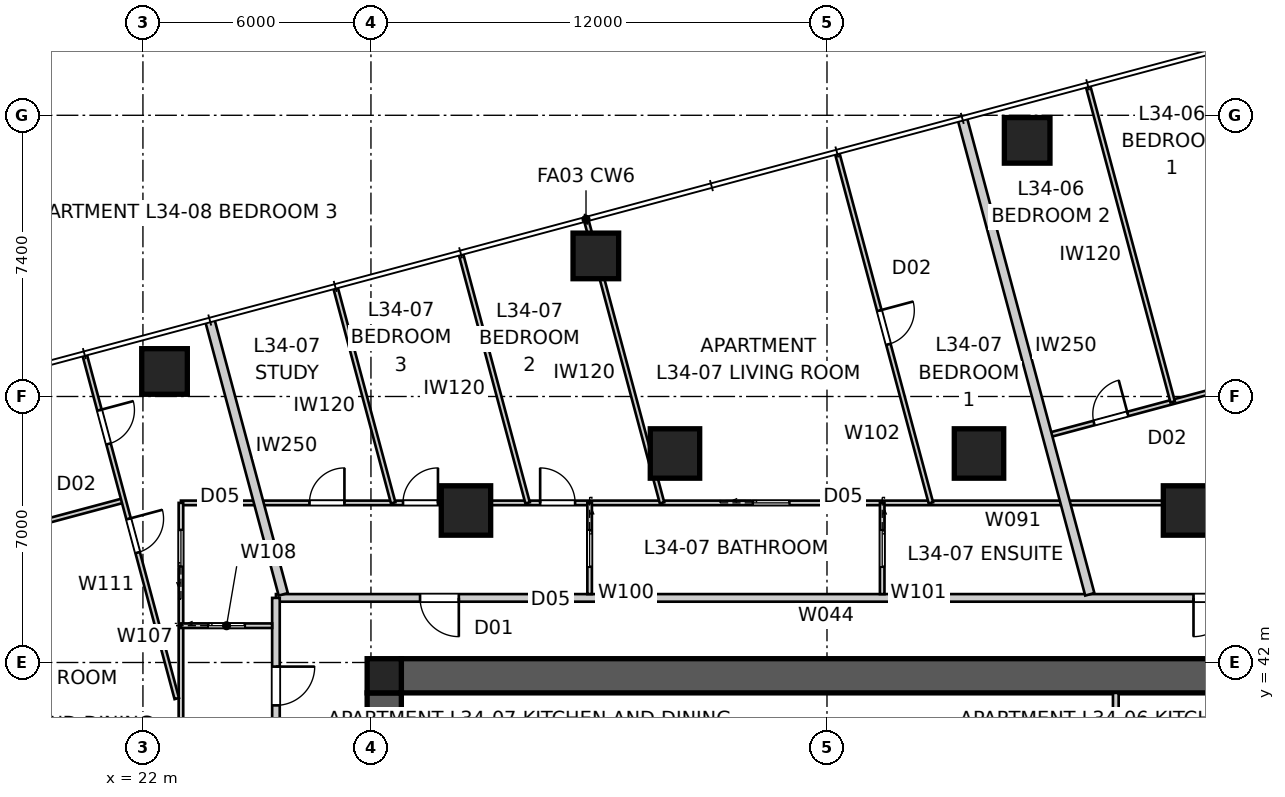
"""IFC4 building model, lengths in metres.
Left out: names, types, materials, properties, quantities, classifications, styles, units other than length and angle.
Written with IfcOpenShell. Run it as: python <this file> out.ifc"""

import sys

from ifc_helpers import new_model, si_unit, direction, frame, frame_2d, origin, origin_2d, place, context, subcontext, project, spatial, polyline, rectangle, outline, extrude, element, fill, save


model = new_model("IFC4")
c1 = context("Model", 3, precision=1e-05, world=origin(), true_north=direction((0.0, 1.0)))
c2 = subcontext(c1, "Body", "Model", "MODEL_VIEW")
j1 = project(units=[si_unit("LENGTHUNIT", "METRE"), si_unit("PLANEANGLEUNIT", "RADIAN")], contexts=[c1])
p1 = place(None, origin())
s1 = spatial("IfcSite", under=j1, at=p1, CompositionType="ELEMENT")
p2 = place(p1, origin())
s2 = spatial("IfcBuilding", under=s1, at=p2, CompositionType="ELEMENT")
p3 = place(p2, frame((0.0, 0.0, 125.2)))
s3 = spatial("IfcBuildingStorey", under=s2, at=p3, CompositionType="ELEMENT", Elevation=125.2)
p4 = place(p3, frame((28.8, 41.65, 0.0), z_axis=(0.0, 0.0, 1.0), x_axis=(1.0, 0.0, 0.0)))
e1 = element("IfcWall", 1, at=p4, inside=s3, PredefinedType="SHEAR", context=c2, shape_type="SweptSolid", body=[
    extrude(outline(polyline([(0.0, -0.45), (22.4, -0.45), (22.4, -0.025), (22.85, -0.025), (22.85, 0.025), (22.4, 0.025), (22.4, 0.45), (0.0, 0.45), (0.0, 0.025), (-0.45, 0.025), (-0.45, -0.025), (0.0, -0.025), (0.0, -0.45)])), origin(), (0.0, 0.0, 1.0), 3.4),
])
p5 = place(p3, frame((28.35, 41.2, 0.0), z_axis=(0.0, 0.0, 1.0), x_axis=(0.0, -1.0, 0.0)))
e2 = element("IfcWall", 2, at=p5, inside=s3, PredefinedType="SHEAR", context=c2, shape_type="SweptSolid", body=[
    extrude(outline(polyline([(0.0, -0.45), (22.4, -0.45), (22.4, -0.025), (22.85, -0.025), (22.85, 0.025), (22.4, 0.025), (22.4, 0.45), (0.0, 0.45), (0.0, 0.025), (-0.45, 0.025), (-0.45, -0.025), (0.0, -0.025), (0.0, -0.45)])), origin(), (0.0, 0.0, 1.0), 3.4),
])
p6 = place(p5, frame((11.14, 0.0, 0.0)))
e3 = element("IfcOpeningElement", 3, at=p6, cuts=e2, PredefinedType="OPENING", context=c2, shape_type="SweptSolid", body=[
    extrude(rectangle(XDim=1.02, YDim=2.4, at=frame_2d((0.51, 1.2))), frame((0.0, 0.46, 0.0), z_axis=(0.0, -1.0, 0.0), x_axis=(1.0, 0.0, 0.0)), (0.0, 0.0, 1.0), 0.92),
])
p7 = place(p3, frame((28.35, 41.65, 0.0), z_axis=(0.0, 0.0, 1.0), x_axis=(1.0, 0.0, 0.0)))
e4 = element("IfcColumn", 4, at=p7, inside=s3, PredefinedType="COLUMN", context=c2, shape_type="SweptSolid", body=[
    extrude(rectangle(XDim=0.9, YDim=0.9, at=origin_2d()), origin(), (0.0, 0.0, 1.0), 3.4),
])
for number, where, z_axis, x_axis in (
    (5, (45.267, 55.74, 0.0), (0.0, 0.0, 1.0), (1.0, 0.0, 0.0)),
    (6, (33.918, 52.699, 0.0), (0.0, 0.0, 1.0), (1.0, 0.0, 0.0)),
    (7, (22.568, 49.658, 0.0), (0.0, 0.0, 1.0), (1.0, 0.0, 0.0)),
):
    element("IfcColumn", number, at=place(p3, frame(where, z_axis=z_axis, x_axis=x_axis)), inside=s3, PredefinedType="COLUMN", context=c2, shape_type="SweptSolid", body=[
        extrude(rectangle(XDim=1.2, YDim=1.2, at=origin_2d()), origin(), (0.0, 0.0, 1.0), 3.4),
    ])
for number, where, z_axis, x_axis in (
    (8, (49.5, 46.0, 0.0), (0.0, 0.0, 1.0), (1.0, 0.0, 0.0)),
    (9, (44.0, 47.5, 0.0), (0.0, 0.0, 1.0), (1.0, 0.0, 0.0)),
    (10, (36.0, 47.5, 0.0), (0.0, 0.0, 1.0), (1.0, 0.0, 0.0)),
    (11, (30.5, 46.0, 0.0), (0.0, 0.0, 1.0), (1.0, 0.0, 0.0)),
):
    element("IfcColumn", number, at=place(p3, frame(where, z_axis=z_axis, x_axis=x_axis)), inside=s3, PredefinedType="COLUMN", context=c2, shape_type="SweptSolid", body=[
        extrude(rectangle(XDim=1.3, YDim=1.3, at=origin_2d()), origin(), (0.0, 0.0, 1.0), 3.4),
    ])
p8 = place(p3, frame((52.52, 43.7, 0.0), z_axis=(0.0, 0.0, 1.0), x_axis=(-1.0, 0.0, 0.0)))
e12 = element("IfcWall", 12, at=p8, inside=s3, PredefinedType="PARTITIONING", context=c2, shape_type="SweptSolid", body=[
    extrude(rectangle(XDim=27.02, YDim=0.2, at=frame_2d((13.51, 0.0))), origin(), (0.0, 0.0, 1.0), 3.25),
])
p9 = place(p8, frame((22.208, 0.0, 0.0)))
e13 = element("IfcOpeningElement", 13, at=p9, cuts=e12, PredefinedType="OPENING", context=c2, shape_type="SweptSolid", body=[
    extrude(rectangle(XDim=1.02, YDim=2.34, at=frame_2d((0.51, 1.17))), frame((0.0, 0.11, 0.0), z_axis=(0.0, -1.0, 0.0), x_axis=(1.0, 0.0, 0.0)), (0.0, 0.0, 1.0), 0.22),
])
p10 = place(p8, frame((1.856, 0.0, 0.0)))
e14 = element("IfcOpeningElement", 14, at=p10, cuts=e12, PredefinedType="OPENING", context=c2, shape_type="SweptSolid", body=[
    extrude(rectangle(XDim=1.02, YDim=2.34, at=frame_2d((0.51, 1.17))), frame((0.0, 0.11, 0.0), z_axis=(0.0, -1.0, 0.0), x_axis=(1.0, 0.0, 0.0)), (0.0, 0.0, 1.0), 0.22),
])
p11 = place(p3, frame((25.5, 43.7, 0.0), z_axis=(0.0, 0.0, 1.0), x_axis=(0.0, -1.0, 0.0)))
e15 = element("IfcWall", 15, at=p11, inside=s3, PredefinedType="PARTITIONING", context=c2, shape_type="SweptSolid", body=[
    extrude(rectangle(XDim=28.2, YDim=0.2, at=frame_2d((14.1, 0.0))), origin(), (0.0, 0.0, 1.0), 3.25),
])
p12 = place(p11, frame((8.742, 0.0, 0.0)))
e16 = element("IfcOpeningElement", 16, at=p12, cuts=e15, PredefinedType="OPENING", context=c2, shape_type="SweptSolid", body=[
    extrude(rectangle(XDim=1.02, YDim=2.34, at=frame_2d((0.51, 1.17))), frame((0.0, 0.11, 0.0), z_axis=(0.0, -1.0, 0.0), x_axis=(1.0, 0.0, 0.0)), (0.0, 0.0, 1.0), 0.22),
])
p13 = place(p11, frame((1.808, 0.0, 0.0)))
e17 = element("IfcOpeningElement", 17, at=p13, cuts=e15, PredefinedType="OPENING", context=c2, shape_type="SweptSolid", body=[
    extrude(rectangle(XDim=1.02, YDim=2.1, at=frame_2d((0.51, 1.05))), frame((0.0, 0.11, 0.0), z_axis=(0.0, -1.0, 0.0), x_axis=(1.0, 0.0, 0.0)), (0.0, 0.0, 1.0), 0.22),
])
p14 = place(p3, frame((43.56, 56.318, 0.0), z_axis=(0.0, 0.0, 1.0), x_axis=(0.258822671559, -0.965924854576, 0.0)))
e18 = element("IfcWall", 18, at=p14, inside=s3, PredefinedType="PARTITIONING", context=c2, shape_type="SweptSolid", body=[
    extrude(rectangle(XDim=12.966, YDim=0.25, at=frame_2d((6.483, 0.0))), origin(), (0.0, 0.0, 1.0), 3.25),
])
p15 = place(p3, frame((23.758, 51.012, 0.0), z_axis=(0.0, 0.0, 1.0), x_axis=(0.258805213744, -0.965929532284, 0.0)))
e19 = element("IfcWall", 19, at=p15, inside=s3, PredefinedType="PARTITIONING", context=c2, shape_type="SweptSolid", body=[
    extrude(rectangle(XDim=7.473, YDim=0.25, at=frame_2d((3.737, 0.0))), origin(), (0.0, 0.0, 1.0), 3.25),
])
p16 = place(p3, frame((47.6, 41.2, 0.0), z_axis=(0.0, 0.0, 1.0), x_axis=(0.0, -1.0, 0.0)))
e20 = element("IfcWall", 20, at=p16, inside=s3, PredefinedType="SOLIDWALL", context=c2, shape_type="SweptSolid", body=[
    extrude(rectangle(XDim=5.9, YDim=0.15, at=frame_2d((2.95, 0.0))), origin(), (0.0, 0.0, 1.0), 3.25),
])
p17 = place(p3, frame((23.0, 46.2, 0.0), z_axis=(0.0, 0.0, 1.0), x_axis=(1.0, 0.0, 0.0)))
e21 = element("IfcWall", 21, at=p17, inside=s3, PredefinedType="PARTITIONING", context=c2, shape_type="SweptSolid", body=[
    extrude(rectangle(XDim=33.2, YDim=0.12, at=frame_2d((16.6, 0.0))), origin(), (0.0, 0.0, 1.0), 2.55),
])
p18 = place(p17, frame((5.844, 0.0, 0.0)))
e22 = element("IfcOpeningElement", 22, at=p18, cuts=e21, PredefinedType="OPENING", context=c2, shape_type="SweptSolid", body=[
    extrude(rectangle(XDim=0.92, YDim=2.34, at=frame_2d((0.46, 1.17))), frame((0.0, 0.07, 0.0), z_axis=(0.0, -1.0, 0.0), x_axis=(1.0, 0.0, 0.0)), (0.0, 0.0, 1.0), 0.14),
])
p19 = place(p17, frame((3.382, 0.0, 0.0)))
e23 = element("IfcOpeningElement", 23, at=p19, cuts=e21, PredefinedType="OPENING", context=c2, shape_type="SweptSolid", body=[
    extrude(rectangle(XDim=0.92, YDim=2.34, at=frame_2d((0.46, 1.17))), frame((0.0, 0.07, 0.0), z_axis=(0.0, -1.0, 0.0), x_axis=(1.0, 0.0, 0.0)), (0.0, 0.0, 1.0), 0.14),
])
p20 = place(p17, frame((9.452, 0.0, 0.0)))
e24 = element("IfcOpeningElement", 24, at=p20, cuts=e21, PredefinedType="OPENING", context=c2, shape_type="SweptSolid", body=[
    extrude(rectangle(XDim=0.92, YDim=2.34, at=frame_2d((0.46, 1.17))), frame((0.0, 0.07, 0.0), z_axis=(0.0, -1.0, 0.0), x_axis=(1.0, 0.0, 0.0)), (0.0, 0.0, 1.0), 0.14),
])
p21 = place(p17, frame((27.775, 0.0, 0.0)))
e25 = element("IfcOpeningElement", 25, at=p21, cuts=e21, PredefinedType="OPENING", context=c2, shape_type="SweptSolid", body=[
    extrude(rectangle(XDim=0.92, YDim=2.34, at=frame_2d((0.46, 1.17))), frame((0.0, 0.07, 0.0), z_axis=(0.0, -1.0, 0.0), x_axis=(1.0, 0.0, 0.0)), (0.0, 0.0, 1.0), 0.14),
])
p22 = place(p17, frame((15.05, 0.0, 0.0)))
e26 = element("IfcOpeningElement", 26, at=p22, cuts=e21, PredefinedType="OPENING", context=c2, shape_type="SweptSolid", body=[
    extrude(rectangle(XDim=0.96, YDim=2.1, at=frame_2d((0.48, 1.05))), frame((0.0, 0.07, 0.0), z_axis=(0.0, -1.0, 0.0), x_axis=(1.0, 0.0, 0.0)), (0.0, 0.0, 1.0), 0.14),
])
p23 = place(p3, frame((45.796, 47.973, 0.0), z_axis=(0.0, 0.0, 1.0), x_axis=(0.965921975889, 0.258833414564, 0.0)))
e27 = element("IfcWall", 27, at=p23, inside=s3, PredefinedType="PARTITIONING", context=c2, shape_type="SweptSolid", body=[
    extrude(rectangle(XDim=14.21, YDim=0.12, at=frame_2d((7.105, 0.0))), origin(), (0.0, 0.0, 1.0), 3.25),
])
p24 = place(p23, frame((8.348, 0.0, 0.0)))
e28 = element("IfcOpeningElement", 28, at=p24, cuts=e27, PredefinedType="OPENING", context=c2, shape_type="SweptSolid", body=[
    extrude(rectangle(XDim=0.92, YDim=2.34, at=frame_2d((0.46, 1.17))), frame((0.0, 0.07, 0.0), z_axis=(0.0, -1.0, 0.0), x_axis=(1.0, 0.0, 0.0)), (0.0, 0.0, 1.0), 0.14),
])
p25 = place(p23, frame((1.273, 0.0, 0.0)))
e29 = element("IfcOpeningElement", 29, at=p25, cuts=e27, PredefinedType="OPENING", context=c2, shape_type="SweptSolid", body=[
    extrude(rectangle(XDim=0.92, YDim=2.34, at=frame_2d((0.46, 1.17))), frame((0.0, 0.07, 0.0), z_axis=(0.0, -1.0, 0.0), x_axis=(1.0, 0.0, 0.0)), (0.0, 0.0, 1.0), 0.14),
])
p26 = place(p3, frame((49.096, 48.857, 0.0), z_axis=(0.0, 0.0, 1.0), x_axis=(-0.258800415469, 0.965930817892, 0.0)))
e30 = element("IfcWall", 30, at=p26, inside=s3, PredefinedType="PARTITIONING", context=c2, shape_type="SweptSolid", body=[
    extrude(rectangle(XDim=8.6, YDim=0.12, at=frame_2d((4.3, 0.0))), origin(), (0.0, 0.0, 1.0), 2.722),
])
p27 = place(p3, frame((33.754, 46.2, 0.0), z_axis=(0.0, 0.0, 1.0), x_axis=(0.0, -1.0, 0.0)))
e31 = element("IfcWall", 31, at=p27, inside=s3, PredefinedType="PARTITIONING", context=c2, shape_type="SweptSolid", body=[
    extrude(rectangle(XDim=2.4, YDim=0.12, at=frame_2d((1.2, 0.0))), origin(), (0.0, 0.0, 1.0), 3.25),
])
p28 = place(p27, frame((0.72, 0.0, 0.0)))
e32 = element("IfcOpeningElement", 32, at=p28, cuts=e31, PredefinedType="OPENING", context=c2, shape_type="SweptSolid", body=[
    extrude(rectangle(XDim=0.96, YDim=2.1, at=frame_2d((0.48, 1.05))), frame((0.0, 0.07, 0.0), z_axis=(0.0, -1.0, 0.0), x_axis=(1.0, 0.0, 0.0)), (0.0, 0.0, 1.0), 0.14),
])
p29 = place(p3, frame((41.453, 46.2, 0.0), z_axis=(0.0, 0.0, 1.0), x_axis=(0.0, -1.0, 0.0)))
e33 = element("IfcWall", 33, at=p29, inside=s3, PredefinedType="PARTITIONING", context=c2, shape_type="SweptSolid", body=[
    extrude(rectangle(XDim=2.4, YDim=0.12, at=frame_2d((1.2, 0.0))), origin(), (0.0, 0.0, 1.0), 3.25),
])
p30 = place(p29, frame((0.72, 0.0, 0.0)))
e34 = element("IfcOpeningElement", 34, at=p30, cuts=e33, PredefinedType="OPENING", context=c2, shape_type="SweptSolid", body=[
    extrude(rectangle(XDim=0.96, YDim=2.1, at=frame_2d((0.48, 1.05))), frame((0.0, 0.07, 0.0), z_axis=(0.0, -1.0, 0.0), x_axis=(1.0, 0.0, 0.0)), (0.0, 0.0, 1.0), 0.14),
])
p31 = place(p3, frame((40.27, 55.395, 0.0), z_axis=(0.0, 0.0, 1.0), x_axis=(0.25881812666, -0.965926072385, 0.0)))
e35 = element("IfcWall", 35, at=p31, inside=s3, PredefinedType="PARTITIONING", context=c2, shape_type="SweptSolid", body=[
    extrude(rectangle(XDim=9.52, YDim=0.12, at=frame_2d((4.76, 0.0))), origin(), (0.0, 0.0, 1.0), 3.25),
])
p32 = place(p31, frame((4.28, 0.0, 0.0)))
e36 = element("IfcOpeningElement", 36, at=p32, cuts=e35, PredefinedType="OPENING", context=c2, shape_type="SweptSolid", body=[
    extrude(rectangle(XDim=0.92, YDim=2.34, at=frame_2d((0.46, 1.17))), frame((0.0, 0.07, 0.0), z_axis=(0.0, -1.0, 0.0), x_axis=(1.0, 0.0, 0.0)), (0.0, 0.0, 1.0), 0.14),
])
p33 = place(p3, frame((35.659, 46.2, 0.0), z_axis=(0.0, 0.0, 1.0), x_axis=(-0.258826555959, 0.96592381373, 0.0)))
e37 = element("IfcWall", 37, at=p33, inside=s3, PredefinedType="PARTITIONING", context=c2, shape_type="SweptSolid", body=[
    extrude(rectangle(XDim=7.688, YDim=0.12, at=frame_2d((3.844, 0.0))), origin(), (0.0, 0.0, 1.0), 3.25),
])
p34 = place(p3, frame((32.122, 46.2, 0.0), z_axis=(0.0, 0.0, 1.0), x_axis=(-0.258811158187, 0.965927939547, 0.0)))
e38 = element("IfcWall", 38, at=p34, inside=s3, PredefinedType="PARTITIONING", context=c2, shape_type="SweptSolid", body=[
    extrude(rectangle(XDim=6.773, YDim=0.12, at=frame_2d((3.386, 0.0))), origin(), (0.0, 0.0, 1.0), 3.25),
])
p35 = place(p3, frame((28.585, 46.2, 0.0), z_axis=(0.0, 0.0, 1.0), x_axis=(-0.258790947109, 0.965933354686, 0.0)))
e39 = element("IfcWall", 39, at=p35, inside=s3, PredefinedType="PARTITIONING", context=c2, shape_type="SweptSolid", body=[
    extrude(rectangle(XDim=5.857, YDim=0.12, at=frame_2d((2.929, 0.0))), origin(), (0.0, 0.0, 1.0), 3.25),
])
p36 = place(p3, frame((23.0, 28.93, 0.0), z_axis=(0.0, 0.0, 1.0), x_axis=(0.0, 1.0, 0.0)))
e40 = element("IfcWall", 40, at=p36, inside=s3, PredefinedType="PARTITIONING", context=c2, shape_type="SweptSolid", body=[
    extrude(rectangle(XDim=17.27, YDim=0.12, at=frame_2d((8.635, 0.0))), origin(), (0.0, 0.0, 1.0), 2.55),
])
p37 = place(p36, frame((5.772, 0.0, 0.0)))
e41 = element("IfcOpeningElement", 41, at=p37, cuts=e40, PredefinedType="OPENING", context=c2, shape_type="SweptSolid", body=[
    extrude(rectangle(XDim=0.92, YDim=2.34, at=frame_2d((0.46, 1.17))), frame((0.0, 0.07, 0.0), z_axis=(0.0, -1.0, 0.0), x_axis=(1.0, 0.0, 0.0)), (0.0, 0.0, 1.0), 0.14),
])
p38 = place(p36, frame((15.599, 0.0, 0.0)))
e42 = element("IfcOpeningElement", 42, at=p38, cuts=e40, PredefinedType="OPENING", context=c2, shape_type="SweptSolid", body=[
    extrude(rectangle(XDim=0.96, YDim=2.1, at=frame_2d((0.48, 1.05))), frame((0.0, 0.07, 0.0), z_axis=(0.0, -1.0, 0.0), x_axis=(1.0, 0.0, 0.0)), (0.0, 0.0, 1.0), 0.14),
])
p39 = place(p36, frame((8.441, 0.0, 0.0)))
e43 = element("IfcOpeningElement", 43, at=p39, cuts=e40, PredefinedType="OPENING", context=c2, shape_type="SweptSolid", body=[
    extrude(rectangle(XDim=0.96, YDim=2.1, at=frame_2d((0.48, 1.05))), frame((0.0, 0.07, 0.0), z_axis=(0.0, -1.0, 0.0), x_axis=(1.0, 0.0, 0.0)), (0.0, 0.0, 1.0), 0.14),
])
p40 = place(p3, frame((23.0, 42.968, 0.0), z_axis=(0.0, 0.0, 1.0), x_axis=(1.0, 0.0, 0.0)))
e44 = element("IfcWall", 44, at=p40, inside=s3, PredefinedType="PARTITIONING", context=c2, shape_type="SweptSolid", body=[
    extrude(rectangle(XDim=2.4, YDim=0.12, at=frame_2d((1.2, 0.0))), origin(), (0.0, 0.0, 1.0), 3.25),
])
p41 = place(p40, frame((0.72, 0.0, 0.0)))
e45 = element("IfcOpeningElement", 45, at=p41, cuts=e44, PredefinedType="OPENING", context=c2, shape_type="SweptSolid", body=[
    extrude(rectangle(XDim=0.96, YDim=2.1, at=frame_2d((0.48, 1.05))), frame((0.0, 0.07, 0.0), z_axis=(0.0, -1.0, 0.0), x_axis=(1.0, 0.0, 0.0)), (0.0, 0.0, 1.0), 0.14),
])
p42 = place(p3, frame((14.931, 44.506, 0.0), z_axis=(0.0, 0.0, 1.0), x_axis=(0.965922865286, 0.258830095464, 0.0)))
e46 = element("IfcWall", 46, at=p42, inside=s3, PredefinedType="PARTITIONING", context=c2, shape_type="SweptSolid", body=[
    extrude(rectangle(XDim=6.793, YDim=0.12, at=frame_2d((3.396, 0.0))), origin(), (0.0, 0.0, 1.0), 3.25),
])
p43 = place(p3, frame((20.468, 50.089, 0.0), z_axis=(0.0, 0.0, 1.0), x_axis=(0.25881390457, -0.965927203676, 0.0)))
e47 = element("IfcWall", 47, at=p43, inside=s3, PredefinedType="PARTITIONING", context=c2, shape_type="SweptSolid", body=[
    extrude(rectangle(XDim=9.357, YDim=0.12, at=frame_2d((4.678, 0.0))), origin(), (0.0, 0.0, 1.0), 2.638),
])
p44 = place(p43, frame((4.461, 0.0, 0.0)))
e48 = element("IfcOpeningElement", 48, at=p44, cuts=e47, PredefinedType="OPENING", context=c2, shape_type="SweptSolid", body=[
    extrude(rectangle(XDim=0.92, YDim=2.34, at=frame_2d((0.46, 1.17))), frame((0.0, 0.07, 0.0), z_axis=(0.0, -1.0, 0.0), x_axis=(1.0, 0.0, 0.0)), (0.0, 0.0, 1.0), 0.14),
])
p45 = place(p43, frame((1.5, 0.0, 0.0)))
e49 = element("IfcOpeningElement", 49, at=p45, cuts=e47, PredefinedType="OPENING", context=c2, shape_type="SweptSolid", body=[
    extrude(rectangle(XDim=0.92, YDim=2.34, at=frame_2d((0.46, 1.17))), frame((0.0, 0.07, 0.0), z_axis=(0.0, -1.0, 0.0), x_axis=(1.0, 0.0, 0.0)), (0.0, 0.0, 1.0), 0.14),
])
p46 = place(p9, origin())
e50 = element("IfcDoor", 50, at=p46, inside=s3, OperationType="SINGLE_SWING_LEFT", PredefinedType="DOOR", context=c2, shape_type="SweptSolid", body=[
    extrude(rectangle(XDim=1.02, YDim=2.34, at=frame_2d((0.51, 1.17))), frame((0.0, 0.025, 0.0), z_axis=(0.0, -1.0, 0.0), x_axis=(1.0, 0.0, 0.0)), (0.0, 0.0, 1.0), 0.05),
])
fill(e13, e50)
p47 = place(p10, origin())
e51 = element("IfcDoor", 51, at=p47, inside=s3, OperationType="SINGLE_SWING_RIGHT", PredefinedType="DOOR", context=c2, shape_type="SweptSolid", body=[
    extrude(rectangle(XDim=1.02, YDim=2.34, at=frame_2d((0.51, 1.17))), frame((0.0, 0.025, 0.0), z_axis=(0.0, -1.0, 0.0), x_axis=(1.0, 0.0, 0.0)), (0.0, 0.0, 1.0), 0.05),
])
fill(e14, e51)
p48 = place(p13, origin())
e52 = element("IfcDoor", 52, at=p48, inside=s3, OperationType="SINGLE_SWING_LEFT", PredefinedType="DOOR", context=c2, shape_type="SweptSolid", body=[
    extrude(rectangle(XDim=1.02, YDim=2.1, at=frame_2d((0.51, 1.05))), frame((0.0, 0.025, 0.0), z_axis=(0.0, -1.0, 0.0), x_axis=(1.0, 0.0, 0.0)), (0.0, 0.0, 1.0), 0.05),
])
fill(e17, e52)
p49 = place(p18, origin())
e53 = element("IfcDoor", 53, at=p49, inside=s3, OperationType="SINGLE_SWING_RIGHT", PredefinedType="DOOR", context=c2, shape_type="SweptSolid", body=[
    extrude(rectangle(XDim=0.92, YDim=2.34, at=frame_2d((0.46, 1.17))), frame((0.0, 0.025, 0.0), z_axis=(0.0, -1.0, 0.0), x_axis=(1.0, 0.0, 0.0)), (0.0, 0.0, 1.0), 0.05),
])
fill(e22, e53)
p50 = place(p19, origin())
e54 = element("IfcDoor", 54, at=p50, inside=s3, OperationType="SINGLE_SWING_RIGHT", PredefinedType="DOOR", context=c2, shape_type="SweptSolid", body=[
    extrude(rectangle(XDim=0.92, YDim=2.34, at=frame_2d((0.46, 1.17))), frame((0.0, 0.025, 0.0), z_axis=(0.0, -1.0, 0.0), x_axis=(1.0, 0.0, 0.0)), (0.0, 0.0, 1.0), 0.05),
])
fill(e23, e54)
p51 = place(p28, origin())
e55 = element("IfcDoor", 55, at=p51, inside=s3, OperationType="SLIDING_TO_LEFT", PredefinedType="DOOR", context=c2, shape_type="SweptSolid", body=[
    extrude(rectangle(XDim=0.96, YDim=2.1, at=frame_2d((0.48, 1.05))), frame((0.0, 0.025, 0.0), z_axis=(0.0, -1.0, 0.0), x_axis=(1.0, 0.0, 0.0)), (0.0, 0.0, 1.0), 0.05),
])
fill(e32, e55)
p52 = place(p20, origin())
e56 = element("IfcDoor", 56, at=p52, inside=s3, OperationType="SINGLE_SWING_LEFT", PredefinedType="DOOR", context=c2, shape_type="SweptSolid", body=[
    extrude(rectangle(XDim=0.92, YDim=2.34, at=frame_2d((0.46, 1.17))), frame((0.0, 0.025, 0.0), z_axis=(0.0, -1.0, 0.0), x_axis=(1.0, 0.0, 0.0)), (0.0, 0.0, 1.0), 0.05),
])
fill(e24, e56)
p53 = place(p41, origin())
e57 = element("IfcDoor", 57, at=p53, inside=s3, OperationType="SLIDING_TO_LEFT", PredefinedType="DOOR", context=c2, shape_type="SweptSolid", body=[
    extrude(rectangle(XDim=0.96, YDim=2.1, at=frame_2d((0.48, 1.05))), frame((0.0, 0.025, 0.0), z_axis=(0.0, -1.0, 0.0), x_axis=(1.0, 0.0, 0.0)), (0.0, 0.0, 1.0), 0.05),
])
fill(e45, e57)
p54 = place(p22, origin())
e58 = element("IfcDoor", 58, at=p54, inside=s3, OperationType="SLIDING_TO_LEFT", PredefinedType="DOOR", context=c2, shape_type="SweptSolid", body=[
    extrude(rectangle(XDim=0.96, YDim=2.1, at=frame_2d((0.48, 1.05))), frame((0.0, 0.025, 0.0), z_axis=(0.0, -1.0, 0.0), x_axis=(1.0, 0.0, 0.0)), (0.0, 0.0, 1.0), 0.05),
])
fill(e26, e58)
p55 = place(p30, origin())
e59 = element("IfcDoor", 59, at=p55, inside=s3, OperationType="SLIDING_TO_LEFT", PredefinedType="DOOR", context=c2, shape_type="SweptSolid", body=[
    extrude(rectangle(XDim=0.96, YDim=2.1, at=frame_2d((0.48, 1.05))), frame((0.0, 0.025, 0.0), z_axis=(0.0, -1.0, 0.0), x_axis=(1.0, 0.0, 0.0)), (0.0, 0.0, 1.0), 0.05),
])
fill(e34, e59)
p56 = place(p25, origin())
e60 = element("IfcDoor", 60, at=p56, inside=s3, OperationType="SINGLE_SWING_RIGHT", PredefinedType="DOOR", context=c2, shape_type="SweptSolid", body=[
    extrude(rectangle(XDim=0.92, YDim=2.34, at=frame_2d((0.46, 1.17))), frame((0.0, 0.025, 0.0), z_axis=(0.0, -1.0, 0.0), x_axis=(1.0, 0.0, 0.0)), (0.0, 0.0, 1.0), 0.05),
])
fill(e29, e60)
p57 = place(p38, origin())
e61 = element("IfcDoor", 61, at=p57, inside=s3, OperationType="SLIDING_TO_LEFT", PredefinedType="DOOR", context=c2, shape_type="SweptSolid", body=[
    extrude(rectangle(XDim=0.96, YDim=2.1, at=frame_2d((0.48, 1.05))), frame((0.0, 0.025, 0.0), z_axis=(0.0, -1.0, 0.0), x_axis=(1.0, 0.0, 0.0)), (0.0, 0.0, 1.0), 0.05),
])
fill(e42, e61)
p58 = place(p32, origin())
e62 = element("IfcDoor", 62, at=p58, inside=s3, OperationType="SINGLE_SWING_LEFT", PredefinedType="DOOR", context=c2, shape_type="SweptSolid", body=[
    extrude(rectangle(XDim=0.92, YDim=2.34, at=frame_2d((0.46, 1.17))), frame((0.0, 0.025, 0.0), z_axis=(0.0, -1.0, 0.0), x_axis=(1.0, 0.0, 0.0)), (0.0, 0.0, 1.0), 0.05),
])
fill(e36, e62)
p59 = place(p44, origin())
e63 = element("IfcDoor", 63, at=p59, inside=s3, OperationType="SINGLE_SWING_LEFT", PredefinedType="DOOR", context=c2, shape_type="SweptSolid", body=[
    extrude(rectangle(XDim=0.92, YDim=2.34, at=frame_2d((0.46, 1.17))), frame((0.0, 0.025, 0.0), z_axis=(0.0, -1.0, 0.0), x_axis=(1.0, 0.0, 0.0)), (0.0, 0.0, 1.0), 0.05),
])
fill(e48, e63)
p60 = place(p45, origin())
e64 = element("IfcDoor", 64, at=p60, inside=s3, OperationType="SINGLE_SWING_LEFT", PredefinedType="DOOR", context=c2, shape_type="SweptSolid", body=[
    extrude(rectangle(XDim=0.92, YDim=2.34, at=frame_2d((0.46, 1.17))), frame((0.0, 0.025, 0.0), z_axis=(0.0, -1.0, 0.0), x_axis=(1.0, 0.0, 0.0)), (0.0, 0.0, 1.0), 0.05),
])
fill(e49, e64)
save(model, sys.argv[1])
